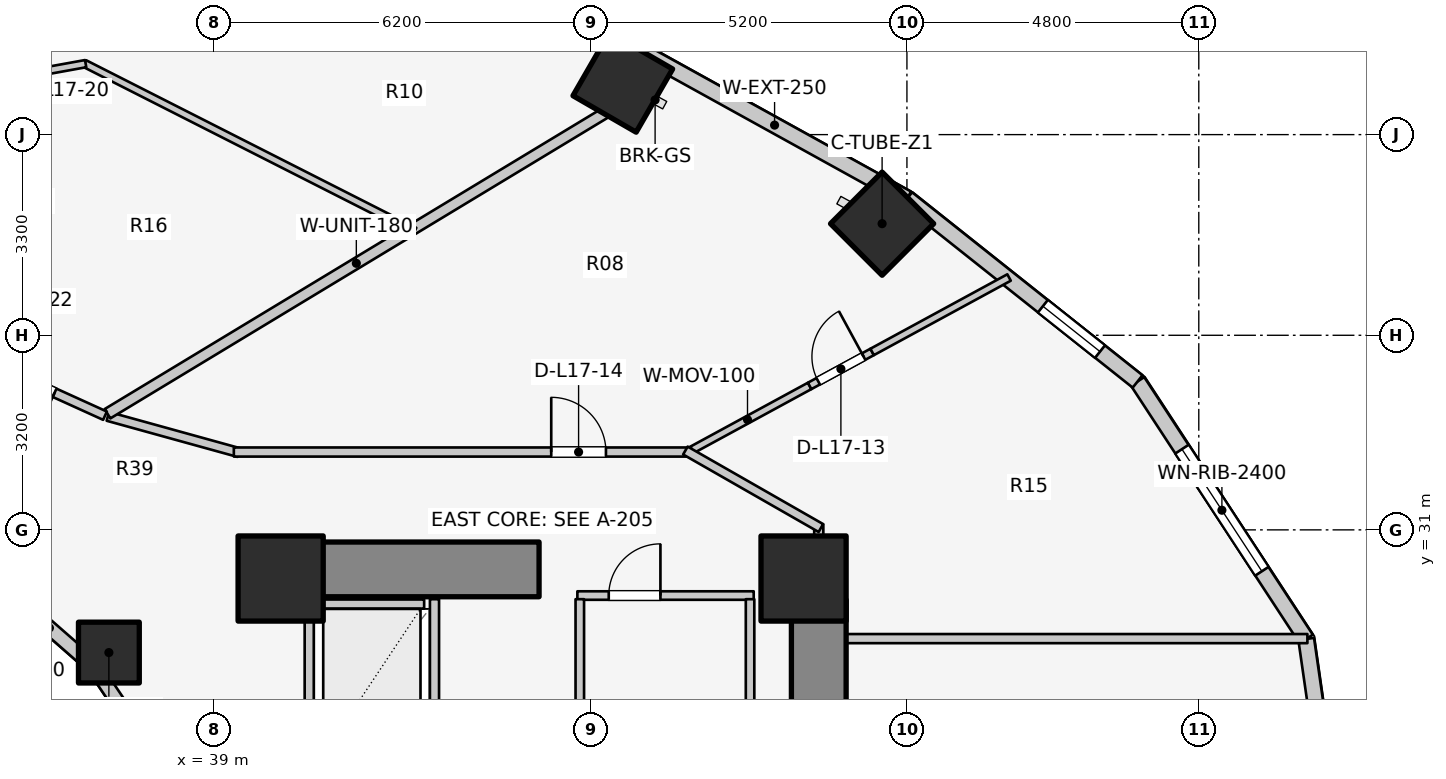
"""IFC4 building model, lengths in metres.
Left out: names, types, materials, properties, quantities, classifications, styles, units other than length and angle.
Written with IfcOpenShell. Run it as: python <this file> out.ifc"""

import sys

from ifc_helpers import new_model, si_unit, direction, frame, frame_2d, origin, origin_2d, place, context, subcontext, project, spatial, rectangle, extrude, element, fill, save


model = new_model("IFC4")
c1 = context("Model", 3, precision=1e-05, world=origin(), true_north=direction((0.0, 1.0)))
c2 = subcontext(c1, "Body", "Model", "MODEL_VIEW")
j1 = project(units=[si_unit("LENGTHUNIT", "METRE"), si_unit("PLANEANGLEUNIT", "RADIAN")], contexts=[c1])
p1 = place(None, origin())
s1 = spatial("IfcSite", under=j1, at=p1, CompositionType="ELEMENT")
p2 = place(p1, origin())
s2 = spatial("IfcBuilding", under=s1, at=p2, CompositionType="ELEMENT")
p3 = place(p2, frame((0.0, 0.0, 58.6)))
s3 = spatial("IfcBuildingStorey", under=s2, at=p3, CompositionType="ELEMENT", Elevation=58.6)
p4 = place(p3, frame((48.95, 17.05, 0.0), z_axis=(0.0, 0.0, 1.0), x_axis=(0.0, 1.0, 0.0)))
e1 = element("IfcWall", 1, at=p4, inside=s3, PredefinedType="SHEAR", context=c2, shape_type="SweptSolid", body=[
    extrude(rectangle(XDim=12.8, YDim=0.9, at=frame_2d((6.4, 0.0))), origin(), (0.0, 0.0, 1.0), 3.1),
])
p5 = place(p3, frame((39.85, 30.35, 0.0), z_axis=(0.0, 0.0, 1.0), x_axis=(1.0, 0.0, 0.0)))
e2 = element("IfcWall", 2, at=p5, inside=s3, PredefinedType="SHEAR", context=c2, shape_type="SweptSolid", body=[
    extrude(rectangle(XDim=4.5, YDim=0.9, at=frame_2d((2.25, 0.0))), origin(), (0.0, 0.0, 1.0), 3.1),
])
for number, where, z_axis, x_axis in (
    (3, (48.7, 30.2, 0.0), (0.0, 0.0, 1.0), (1.0, 0.0, 0.0)),
    (4, (40.1, 30.2, 0.0), (0.0, 0.0, 1.0), (1.0, 0.0, 0.0)),
):
    element("IfcColumn", number, at=place(p3, frame(where, z_axis=z_axis, x_axis=x_axis)), inside=s3, PredefinedType="COLUMN", context=c2, shape_type="SweptSolid", body=[
        extrude(rectangle(XDim=1.4, YDim=1.4, at=origin_2d()), origin(), (0.0, 0.0, 1.0), 3.1),
    ])
p6 = place(p3, frame((37.275, 28.982, 0.0), z_axis=(0.0, 0.0, 1.0), x_axis=(1.0, 0.0, 0.0)))
e5 = element("IfcColumn", 5, at=p6, inside=s3, PredefinedType="COLUMN", context=c2, shape_type="SweptSolid", body=[
    extrude(rectangle(XDim=1.0, YDim=1.0, at=origin_2d()), origin(), (0.0, 0.0, 1.0), 3.1),
])
for number, where, z_axis, x_axis in (
    (6, (49.992, 36.035, 0.0), (0.0, 0.0, 1.0), (0.707, 0.707, 0.0)),
    (7, (45.727, 38.359, 0.0), (0.0, 0.0, 1.0), (0.5, 0.866, 0.0)),
):
    element("IfcColumn", number, at=place(p3, frame(where, z_axis=z_axis, x_axis=x_axis)), inside=s3, PredefinedType="COLUMN", context=c2, shape_type="SweptSolid", body=[
        extrude(rectangle(XDim=1.2, YDim=1.2, at=origin_2d()), origin(), (0.0, 0.0, 1.0), 3.1),
    ])
p7 = place(p3, frame((38.166, 27.06, 0.0), z_axis=(0.0, 0.0, 1.0), x_axis=(-0.558197800898, 0.829707909492, 0.0)))
e8 = element("IfcWall", 8, at=p7, inside=s3, PredefinedType="STANDARD", context=c2, shape_type="SweptSolid", body=[
    extrude(rectangle(XDim=2.027, YDim=0.23, at=frame_2d((1.013, 0.0))), origin(), (0.0, 0.0, 1.0), 2.16),
])
p8 = place(p3, frame((37.035, 28.742, 0.0), z_axis=(0.0, 0.0, 1.0), x_axis=(-0.752576694707, 0.658504607869, 0.0)))
e9 = element("IfcWall", 9, at=p8, inside=s3, PredefinedType="STANDARD", context=c2, shape_type="SweptSolid", body=[
    extrude(rectangle(XDim=1.959, YDim=0.23, at=frame_2d((0.98, 0.0))), origin(), (0.0, 0.0, 1.0), 2.16),
])
p9 = place(p3, frame((57.86, 23.0, 0.0), z_axis=(0.0, 0.0, 1.0), x_axis=(-0.142528001686, 0.989790770181, 0.0)))
e10 = element("IfcWall", 10, at=p9, inside=s3, PredefinedType="STANDARD", context=c2, shape_type="SweptSolid", body=[
    extrude(rectangle(XDim=6.269, YDim=0.26, at=frame_2d((3.135, 0.0))), origin(), (0.0, 0.0, 1.0), 2.85),
])
p10 = place(p9, frame((3.217, 0.0, 0.75)))
e11 = element("IfcOpeningElement", 11, at=p10, cuts=e10, PredefinedType="OPENING", context=c2, shape_type="SweptSolid", body=[
    extrude(rectangle(XDim=1.2, YDim=1.5, at=frame_2d((0.6, 0.75))), frame((0.0, 0.14, 0.0), z_axis=(0.0, -1.0, 0.0), x_axis=(1.0, 0.0, 0.0)), (0.0, 0.0, 1.0), 0.28),
])
p11 = place(p3, frame((56.967, 29.205, 0.0), z_axis=(0.0, 0.0, 1.0), x_axis=(-0.547702757047, 0.836672988642, 0.0)))
e12 = element("IfcWall", 12, at=p11, inside=s3, PredefinedType="STANDARD", context=c2, shape_type="SweptSolid", body=[
    extrude(rectangle(XDim=5.062, YDim=0.26, at=frame_2d((2.531, 0.0))), origin(), (0.0, 0.0, 1.0), 2.85),
])
p12 = place(p11, frame((1.331, 0.0, 0.75)))
e13 = element("IfcOpeningElement", 13, at=p12, cuts=e12, PredefinedType="OPENING", context=c2, shape_type="SweptSolid", body=[
    extrude(rectangle(XDim=2.4, YDim=1.7, at=frame_2d((1.2, 0.85))), frame((0.0, 0.14, 0.0), z_axis=(0.0, -1.0, 0.0), x_axis=(1.0, 0.0, 0.0)), (0.0, 0.0, 1.0), 0.28),
])
p13 = place(p3, frame((54.194, 33.441, 0.0), z_axis=(0.0, 0.0, 1.0), x_axis=(-0.783123133379, 0.621866672179, 0.0)))
e14 = element("IfcWall", 14, at=p13, inside=s3, PredefinedType="STANDARD", context=c2, shape_type="SweptSolid", body=[
    extrude(rectangle(XDim=4.839, YDim=0.26, at=frame_2d((2.419, 0.0))), origin(), (0.0, 0.0, 1.0), 2.85),
])
p14 = place(p13, frame((0.789, 0.0, 0.75)))
e15 = element("IfcOpeningElement", 15, at=p14, cuts=e14, PredefinedType="OPENING", context=c2, shape_type="SweptSolid", body=[
    extrude(rectangle(XDim=1.2, YDim=1.5, at=frame_2d((0.6, 0.75))), frame((0.0, 0.14, 0.0), z_axis=(0.0, -1.0, 0.0), x_axis=(1.0, 0.0, 0.0)), (0.0, 0.0, 1.0), 0.28),
])
p15 = place(p3, frame((50.405, 36.45, 0.0), z_axis=(0.0, 0.0, 1.0), x_axis=(-0.875137303239, 0.483874674352, 0.0)))
e16 = element("IfcWall", 16, at=p15, inside=s3, PredefinedType="STANDARD", context=c2, shape_type="SweptSolid", body=[
    extrude(rectangle(XDim=4.985, YDim=0.26, at=frame_2d((2.493, 0.0))), origin(), (0.0, 0.0, 1.0), 2.85),
])
p16 = place(p3, frame((46.042, 38.862, 0.0), z_axis=(0.0, 0.0, 1.0), x_axis=(-0.958843593522, 0.283934786811, 0.0)))
e17 = element("IfcWall", 17, at=p16, inside=s3, PredefinedType="STANDARD", context=c2, shape_type="SweptSolid", body=[
    extrude(rectangle(XDim=5.955, YDim=0.26, at=frame_2d((2.978, 0.0))), origin(), (0.0, 0.0, 1.0), 2.85),
])
p17 = place(p16, frame((1.778, 0.0, 0.75)))
e18 = element("IfcOpeningElement", 18, at=p17, cuts=e17, PredefinedType="OPENING", context=c2, shape_type="SweptSolid", body=[
    extrude(rectangle(XDim=2.4, YDim=1.7, at=frame_2d((1.2, 0.85))), frame((0.0, 0.14, 0.0), z_axis=(0.0, -1.0, 0.0), x_axis=(1.0, 0.0, 0.0)), (0.0, 0.0, 1.0), 0.28),
])
p18 = place(p3, frame((40.74, 29.78, 0.0), z_axis=(0.0, 0.0, 1.0), x_axis=(1.0, 0.0, 0.0)))
e19 = element("IfcWall", 19, at=p18, inside=s3, PredefinedType="SOLIDWALL", context=c2, shape_type="SweptSolid", body=[
    extrude(rectangle(XDim=1.72, YDim=0.15, at=frame_2d((0.86, 0.0))), origin(), (0.0, 0.0, 1.0), 2.855),
])
for number, where, z_axis, x_axis in (
    (20, (40.57, 27.14, 0.0), (0.0, 0.0, 1.0), (0.0, 1.0, 0.0)),
    (21, (42.63, 27.14, 0.0), (0.0, 0.0, 1.0), (0.0, 1.0, 0.0)),
):
    element("IfcWall", number, at=place(p3, frame(where, z_axis=z_axis, x_axis=x_axis)), inside=s3, PredefinedType="SOLIDWALL", context=c2, shape_type="SweptSolid", body=[
        extrude(rectangle(XDim=2.72, YDim=0.15, at=frame_2d((1.36, 0.0))), origin(), (0.0, 0.0, 1.0), 2.855),
    ])
p19 = place(p3, frame((44.98, 29.92, 0.0), z_axis=(0.0, 0.0, 1.0), x_axis=(1.0, 0.0, 0.0)))
e22 = element("IfcWall", 22, at=p19, inside=s3, PredefinedType="PLUMBINGWALL", context=c2, shape_type="SweptSolid", body=[
    extrude(rectangle(XDim=2.9, YDim=0.14, at=frame_2d((1.45, 0.0))), origin(), (0.0, 0.0, 1.0), 2.855),
])
p20 = place(p19, frame((0.516, 0.0, 0.0)))
e23 = element("IfcOpeningElement", 23, at=p20, cuts=e22, PredefinedType="OPENING", context=c2, shape_type="SweptSolid", body=[
    extrude(rectangle(XDim=0.85, YDim=2.05, at=frame_2d((0.425, 1.025))), frame((0.0, 0.08, 0.0), z_axis=(0.0, -1.0, 0.0), x_axis=(1.0, 0.0, 0.0)), (0.0, 0.0, 1.0), 0.16),
])
for number, where, z_axis, x_axis in (
    (24, (45.02, 25.98, 0.0), (0.0, 0.0, 1.0), (0.0, 1.0, 0.0)),
    (25, (47.82, 25.98, 0.0), (0.0, 0.0, 1.0), (0.0, 1.0, 0.0)),
):
    element("IfcWall", number, at=place(p3, frame(where, z_axis=z_axis, x_axis=x_axis)), inside=s3, PredefinedType="PLUMBINGWALL", context=c2, shape_type="SweptSolid", body=[
        extrude(rectangle(XDim=3.88, YDim=0.14, at=frame_2d((1.94, 0.0))), origin(), (0.0, 0.0, 1.0), 2.855),
    ])
p21 = place(p3, frame((48.95, 29.212, 0.0), z_axis=(0.0, 0.0, 1.0), x_axis=(1.0, 0.0, 0.0)))
e26 = element("IfcWall", 26, at=p21, inside=s3, PredefinedType="PARTITIONING", context=c2, shape_type="SweptSolid", body=[
    extrude(rectangle(XDim=8.036, YDim=0.15, at=frame_2d((4.018, 0.0))), origin(), (0.0, 0.0, 1.0), 2.855),
])
p22 = place(p3, frame((48.95, 29.8, 0.0), z_axis=(0.0, 0.0, 1.0), x_axis=(0.0, 1.0, 0.0)))
e27 = element("IfcWall", 27, at=p22, inside=s3, PredefinedType="PARTITIONING", context=c2, shape_type="SweptSolid", body=[
    extrude(rectangle(XDim=1.29, YDim=0.15, at=frame_2d((0.645, 0.0))), origin(), (0.0, 0.0, 1.0), 2.069),
])
p23 = place(p3, frame((46.756, 32.256, 0.0), z_axis=(0.0, 0.0, 1.0), x_axis=(0.878580476603, 0.477594332181, 0.0)))
e28 = element("IfcWall", 28, at=p23, inside=s3, PredefinedType="MOVABLE", context=c2, shape_type="SweptSolid", body=[
    extrude(rectangle(XDim=2.326, YDim=0.12, at=frame_2d((1.163, 0.0))), origin(), (0.0, 0.0, 1.0), 2.855),
])
p24 = place(p3, frame((48.8, 33.367, 0.0), z_axis=(0.0, 0.0, 1.0), x_axis=(0.878540750178, 0.4776674055, 0.0)))
e29 = element("IfcWall", 29, at=p24, inside=s3, PredefinedType="MOVABLE", context=c2, shape_type="SweptSolid", body=[
    extrude(rectangle(XDim=1.17, YDim=0.12, at=frame_2d((0.585, 0.0))), origin(), (0.0, 0.0, 1.0), 2.11),
])
p25 = place(p24, frame((0.16, 0.0, 0.0)))
e30 = element("IfcOpeningElement", 30, at=p25, cuts=e29, PredefinedType="OPENING", context=c2, shape_type="SweptSolid", body=[
    extrude(rectangle(XDim=0.85, YDim=2.05, at=frame_2d((0.425, 1.025))), frame((0.0, 0.07, 0.0), z_axis=(0.0, -1.0, 0.0), x_axis=(1.0, 0.0, 0.0)), (0.0, 0.0, 1.0), 0.14),
])
p26 = place(p3, frame((49.828, 33.926, 0.0), z_axis=(0.0, 0.0, 1.0), x_axis=(0.878524579981, 0.477697145029, 0.0)))
e31 = element("IfcWall", 31, at=p26, inside=s3, PredefinedType="MOVABLE", context=c2, shape_type="SweptSolid", body=[
    extrude(rectangle(XDim=2.563, YDim=0.12, at=frame_2d((1.281, 0.0))), origin(), (0.0, 0.0, 1.0), 2.069),
])
p27 = place(p3, frame((37.258, 32.867, 0.0), z_axis=(0.0, 0.0, 1.0), x_axis=(0.963833843713, -0.266503886865, 0.0)))
e32 = element("IfcWall", 32, at=p27, inside=s3, PredefinedType="PARTITIONING", context=c2, shape_type="SweptSolid", body=[
    extrude(rectangle(XDim=2.232, YDim=0.15, at=frame_2d((1.116, 0.0))), origin(), (0.0, 0.0, 1.0), 2.237),
])
p28 = place(p3, frame((39.33, 32.28, 0.0), z_axis=(0.0, 0.0, 1.0), x_axis=(1.0, 0.0, 0.0)))
e33 = element("IfcWall", 33, at=p28, inside=s3, PredefinedType="PARTITIONING", context=c2, shape_type="SweptSolid", body=[
    extrude(rectangle(XDim=7.52, YDim=0.15, at=frame_2d((3.76, 0.0))), origin(), (0.0, 0.0, 1.0), 2.237),
])
p29 = place(p28, frame((5.22, 0.0, 0.0)))
e34 = element("IfcOpeningElement", 34, at=p29, cuts=e33, PredefinedType="OPENING", context=c2, shape_type="SweptSolid", body=[
    extrude(rectangle(XDim=0.9, YDim=2.1, at=frame_2d((0.45, 1.05))), frame((0.0, 0.085, 0.0), z_axis=(0.0, -1.0, 0.0), x_axis=(1.0, 0.0, 0.0)), (0.0, 0.0, 1.0), 0.17),
])
p30 = place(p3, frame((46.757, 32.305, 0.0), z_axis=(0.0, 0.0, 1.0), x_axis=(0.867991349648, -0.496579315857, 0.0)))
e35 = element("IfcWall", 35, at=p30, inside=s3, PredefinedType="PARTITIONING", context=c2, shape_type="SweptSolid", body=[
    extrude(rectangle(XDim=2.567, YDim=0.15, at=frame_2d((1.283, 0.0))), origin(), (0.0, 0.0, 1.0), 2.069),
])
p31 = place(p3, frame((37.252, 32.91, 0.0), z_axis=(0.0, 0.0, 1.0), x_axis=(0.855817136021, 0.517278483694, 0.0)))
e36 = element("IfcWall", 36, at=p31, inside=s3, PredefinedType="PARTITIONING", context=c2, shape_type="SweptSolid", body=[
    extrude(rectangle(XDim=9.564, YDim=0.18, at=frame_2d((4.782, 0.0))), origin(), (0.0, 0.0, 1.0), 2.237),
])
p32 = place(p3, frame((42.305, 35.914, 0.0), z_axis=(0.0, 0.0, 1.0), x_axis=(-0.891749407737, 0.452529550195, 0.0)))
e37 = element("IfcWall", 37, at=p32, inside=s3, PredefinedType="MOVABLE", context=c2, shape_type="SweptSolid", body=[
    extrude(rectangle(XDim=6.09, YDim=0.12, at=frame_2d((3.045, 0.0))), origin(), (0.0, 0.0, 1.0), 2.237),
])
p33 = place(p3, frame((36.893, 38.667, 0.0), z_axis=(0.0, 0.0, 1.0), x_axis=(-0.983992567634, -0.178209502665, 0.0)))
e38 = element("IfcWall", 38, at=p33, inside=s3, PredefinedType="MOVABLE", context=c2, shape_type="SweptSolid", body=[
    extrude(rectangle(XDim=5.022, YDim=0.12, at=frame_2d((2.511, 0.0))), origin(), (0.0, 0.0, 1.0), 2.237),
])
p34 = place(p33, frame((2.036, 0.0, 0.0)))
e39 = element("IfcOpeningElement", 39, at=p34, cuts=e38, PredefinedType="OPENING", context=c2, shape_type="SweptSolid", body=[
    extrude(rectangle(XDim=0.95, YDim=2.1, at=frame_2d((0.475, 1.05))), frame((0.0, 0.07, 0.0), z_axis=(0.0, -1.0, 0.0), x_axis=(1.0, 0.0, 0.0)), (0.0, 0.0, 1.0), 0.14),
])
p35 = place(p3, frame((37.211, 32.877, 0.0), z_axis=(0.0, 0.0, 1.0), x_axis=(-0.910568469686, 0.41335827319, 0.0)))
e40 = element("IfcWall", 40, at=p35, inside=s3, PredefinedType="PARTITIONING", context=c2, shape_type="SweptSolid", body=[
    extrude(rectangle(XDim=2.772, YDim=0.15, at=frame_2d((1.386, 0.0))), origin(), (0.0, 0.0, 1.0), 2.237),
])
p36 = place(p35, frame((0.911, 0.0, 0.0)))
e41 = element("IfcOpeningElement", 41, at=p36, cuts=e40, PredefinedType="OPENING", context=c2, shape_type="SweptSolid", body=[
    extrude(rectangle(XDim=0.95, YDim=2.1, at=frame_2d((0.475, 1.05))), frame((0.0, 0.085, 0.0), z_axis=(0.0, -1.0, 0.0), x_axis=(1.0, 0.0, 0.0)), (0.0, 0.0, 1.0), 0.17),
])
p37 = place(p12, origin())
e42 = element("IfcWindow", 42, at=p37, inside=s3, PartitioningType="SINGLE_PANEL", PredefinedType="WINDOW", context=c2, shape_type="SweptSolid", body=[
    extrude(rectangle(XDim=2.4, YDim=1.7, at=frame_2d((1.2, 0.85))), frame((0.0, 0.03, 0.0), z_axis=(0.0, -1.0, 0.0), x_axis=(1.0, 0.0, 0.0)), (0.0, 0.0, 1.0), 0.06),
])
fill(e13, e42)
p38 = place(p14, origin())
e43 = element("IfcWindow", 43, at=p38, inside=s3, PartitioningType="SINGLE_PANEL", PredefinedType="WINDOW", context=c2, shape_type="SweptSolid", body=[
    extrude(rectangle(XDim=1.2, YDim=1.5, at=frame_2d((0.6, 0.75))), frame((0.0, 0.03, 0.0), z_axis=(0.0, -1.0, 0.0), x_axis=(1.0, 0.0, 0.0)), (0.0, 0.0, 1.0), 0.06),
])
fill(e15, e43)
p39 = place(p20, origin())
e44 = element("IfcDoor", 44, at=p39, inside=s3, OperationType="SINGLE_SWING_RIGHT", PredefinedType="DOOR", context=c2, shape_type="SweptSolid", body=[
    extrude(rectangle(XDim=0.85, YDim=2.05, at=frame_2d((0.425, 1.025))), frame((0.0, 0.025, 0.0), z_axis=(0.0, -1.0, 0.0), x_axis=(1.0, 0.0, 0.0)), (0.0, 0.0, 1.0), 0.05),
])
fill(e23, e44)
p40 = place(p25, origin())
e45 = element("IfcDoor", 45, at=p40, inside=s3, OperationType="SINGLE_SWING_RIGHT", PredefinedType="DOOR", context=c2, shape_type="SweptSolid", body=[
    extrude(rectangle(XDim=0.85, YDim=2.05, at=frame_2d((0.425, 1.025))), frame((0.0, 0.025, 0.0), z_axis=(0.0, -1.0, 0.0), x_axis=(1.0, 0.0, 0.0)), (0.0, 0.0, 1.0), 0.05),
])
fill(e30, e45)
p41 = place(p29, origin())
e46 = element("IfcDoor", 46, at=p41, inside=s3, OperationType="SINGLE_SWING_LEFT", PredefinedType="DOOR", context=c2, shape_type="SweptSolid", body=[
    extrude(rectangle(XDim=0.9, YDim=2.1, at=frame_2d((0.45, 1.05))), frame((0.0, 0.025, 0.0), z_axis=(0.0, -1.0, 0.0), x_axis=(1.0, 0.0, 0.0)), (0.0, 0.0, 1.0), 0.05),
])
fill(e34, e46)
p42 = place(p36, origin())
e47 = element("IfcDoor", 47, at=p42, inside=s3, OperationType="SINGLE_SWING_LEFT", PredefinedType="DOOR", context=c2, shape_type="SweptSolid", body=[
    extrude(rectangle(XDim=0.95, YDim=2.1, at=frame_2d((0.475, 1.05))), frame((0.0, 0.025, 0.0), z_axis=(0.0, -1.0, 0.0), x_axis=(1.0, 0.0, 0.0)), (0.0, 0.0, 1.0), 0.05),
])
fill(e41, e47)
save(model, sys.argv[1])
